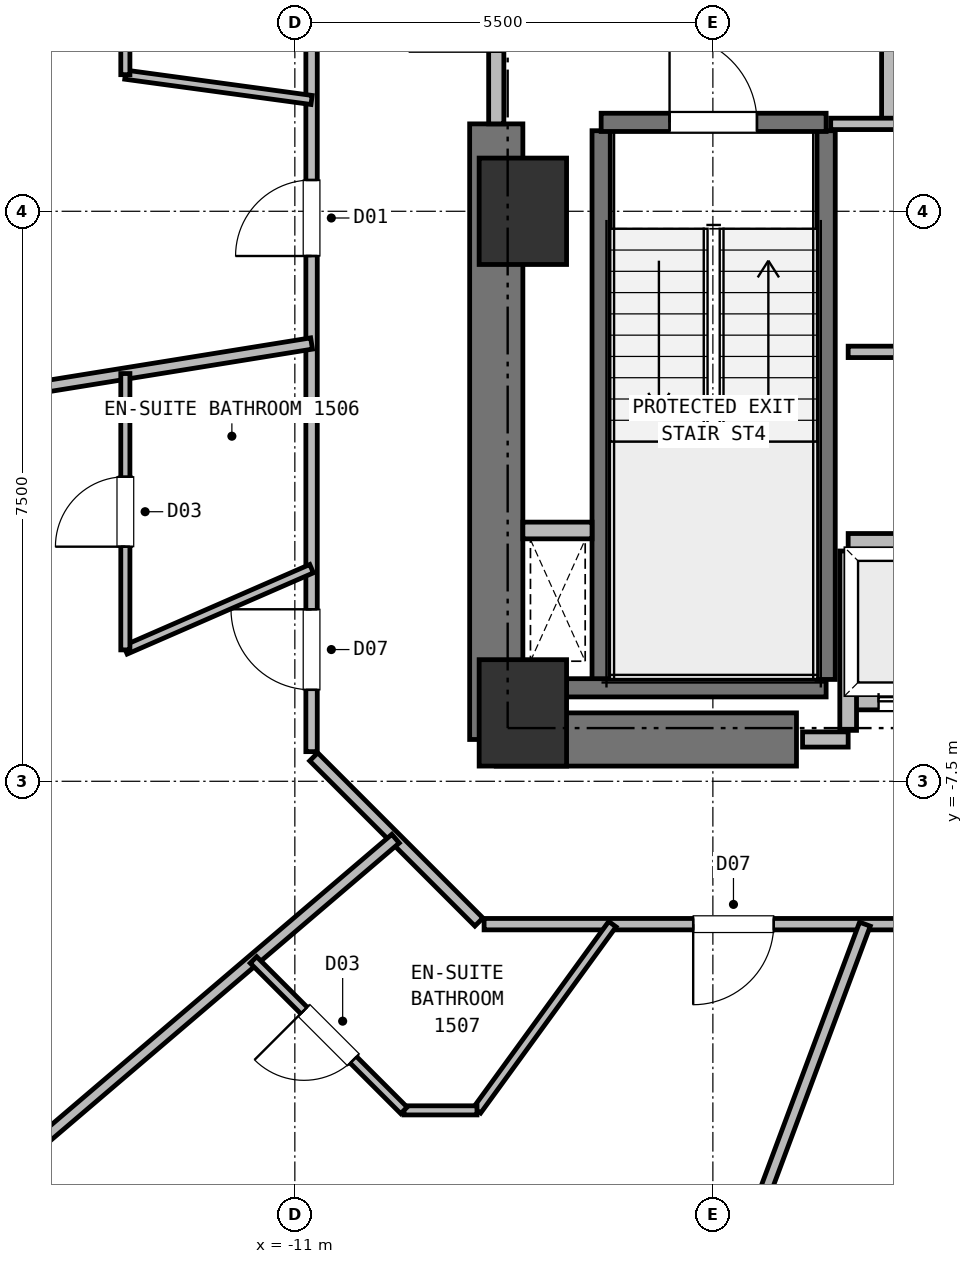
"""IFC4 building model, lengths in metres.
Left out: names, types, materials, properties, quantities, classifications, styles, units other than length and angle.
Written with IfcOpenShell. Run it as: python <this file> out.ifc"""

import sys

from ifc_helpers import new_model, si_unit, direction, frame, frame_2d, origin, origin_2d, place, context, subcontext, project, spatial, rectangle, extrude, element, fill, save


model = new_model("IFC4")
c1 = context("Model", 3, precision=1e-05, world=origin(), true_north=direction((0.0, 1.0)))
c2 = subcontext(c1, "Body", "Model", "MODEL_VIEW")
j1 = project(units=[si_unit("LENGTHUNIT", "METRE"), si_unit("PLANEANGLEUNIT", "RADIAN")], contexts=[c1])
p1 = place(None, origin())
s1 = spatial("IfcSite", under=j1, at=p1, CompositionType="ELEMENT")
p2 = place(p1, origin())
s2 = spatial("IfcBuilding", under=s1, at=p2, CompositionType="ELEMENT")
p3 = place(p2, frame((0.0, 0.0, 53.0)))
s3 = spatial("IfcBuildingStorey", under=s2, at=p3, CompositionType="ELEMENT", Elevation=53.0)
for number, where, z_axis, x_axis in (
    (1, (-8.0, -6.6, 0.0), (0.0, 0.0, 1.0), (1.0, 0.0, 0.0)),
    (2, (-8.0, 0.0, 0.0), (0.0, 0.0, 1.0), (1.0, 0.0, 0.0)),
):
    element("IfcColumn", number, at=place(p3, frame(where, z_axis=z_axis, x_axis=x_axis)), inside=s3, PredefinedType="COLUMN", context=c2, shape_type="SweptSolid", body=[
        extrude(rectangle(XDim=1.15, YDim=1.4, at=origin_2d()), origin(), (0.0, 0.0, 1.0), 3.75),
    ])
p4 = place(p3, frame((-8.35, -6.95, 0.0), z_axis=(0.0, 0.0, 1.0), x_axis=(1.0, 0.0, 0.0)))
e3 = element("IfcWall", 3, at=p4, inside=s3, PredefinedType="SHEAR", context=c2, shape_type="SweptSolid", body=[
    extrude(rectangle(XDim=3.95, YDim=0.7, at=frame_2d((1.975, 0.0))), origin(), (0.0, 0.0, 1.0), 3.5),
])
p5 = place(p3, frame((-8.35, -6.95, 0.0), z_axis=(0.0, 0.0, 1.0), x_axis=(0.0, 1.0, 0.0)))
e4 = element("IfcWall", 4, at=p5, inside=s3, PredefinedType="SHEAR", context=c2, shape_type="SweptSolid", body=[
    extrude(rectangle(XDim=8.1, YDim=0.7, at=frame_2d((4.05, 0.0))), origin(), (0.0, 0.0, 1.0), 3.5),
])
p6 = place(p3, frame((-6.97, -6.16, 0.0), z_axis=(0.0, 0.0, 1.0), x_axis=(0.0, 1.0, 0.0)))
e5 = element("IfcWall", 5, at=p6, inside=s3, PredefinedType="SHEAR", context=c2, shape_type="SweptSolid", body=[
    extrude(rectangle(XDim=7.22, YDim=0.24, at=frame_2d((3.61, 0.0))), origin(), (0.0, 0.0, 1.0), 3.5),
])
p7 = place(p3, frame((-7.425, -6.27, 0.0), z_axis=(0.0, 0.0, 1.0), x_axis=(1.0, 0.0, 0.0)))
e6 = element("IfcWall", 6, at=p7, inside=s3, PredefinedType="SHEAR", context=c2, shape_type="SweptSolid", body=[
    extrude(rectangle(XDim=3.415, YDim=0.24, at=frame_2d((1.708, 0.0))), origin(), (0.0, 0.0, 1.0), 3.5),
])
p8 = place(p3, frame((-4.01, -6.16, 0.0), z_axis=(0.0, 0.0, 1.0), x_axis=(0.0, 1.0, 0.0)))
e7 = element("IfcWall", 7, at=p8, inside=s3, PredefinedType="SHEAR", context=c2, shape_type="SweptSolid", body=[
    extrude(rectangle(XDim=7.22, YDim=0.24, at=frame_2d((3.61, 0.0))), origin(), (0.0, 0.0, 1.0), 3.5),
])
p9 = place(p3, frame((-6.97, 1.17, 0.0), z_axis=(0.0, 0.0, 1.0), x_axis=(1.0, 0.0, 0.0)))
e8 = element("IfcWall", 8, at=p9, inside=s3, PredefinedType="SHEAR", context=c2, shape_type="SweptSolid", body=[
    extrude(rectangle(XDim=2.96, YDim=0.24, at=frame_2d((1.48, 0.0))), origin(), (0.0, 0.0, 1.0), 3.5),
])
p10 = place(p9, frame((0.9, 0.0, 0.0)))
e9 = element("IfcOpeningElement", 9, at=p10, cuts=e8, PredefinedType="OPENING", context=c2, shape_type="SweptSolid", body=[
    extrude(rectangle(XDim=1.15, YDim=2.15, at=frame_2d((0.575, 1.075))), frame((0.0, 0.13, 0.0), z_axis=(0.0, -1.0, 0.0), x_axis=(1.0, 0.0, 0.0)), (0.0, 0.0, 1.0), 0.26),
])
p11 = place(p3, frame((-8.0, -4.2, 0.0), z_axis=(0.0, 0.0, 1.0), x_axis=(1.0, 0.0, 0.0)))
e10 = element("IfcWall", 10, at=p11, inside=s3, PredefinedType="PARTITIONING", context=c2, shape_type="SweptSolid", body=[
    extrude(rectangle(XDim=0.91, YDim=0.22, at=frame_2d((0.455, 0.0))), origin(), (0.0, 0.0, 1.0), 3.5),
])
p12 = place(p3, frame((-3.72, -6.45, 0.0), z_axis=(0.0, 0.0, 1.0), x_axis=(1.0, 0.0, 0.0)))
e11 = element("IfcWall", 11, at=p12, inside=s3, PredefinedType="PARTITIONING", context=c2, shape_type="SweptSolid", body=[
    extrude(rectangle(XDim=1.86, YDim=0.22, at=frame_2d((0.93, 0.0))), origin(), (0.0, 0.0, 1.0), 3.08),
])
p13 = place(p12, frame((0.4, 0.0, 0.0)))
e12 = element("IfcOpeningElement", 12, at=p13, cuts=e11, PredefinedType="OPENING", context=c2, shape_type="SweptSolid", body=[
    extrude(rectangle(XDim=1.06, YDim=2.15, at=frame_2d((0.53, 1.075))), frame((0.0, 0.12, 0.0), z_axis=(0.0, -1.0, 0.0), x_axis=(1.0, 0.0, 0.0)), (0.0, 0.0, 1.0), 0.24),
])
p14 = place(p3, frame((-3.72, -4.35, 0.0), z_axis=(0.0, 0.0, 1.0), x_axis=(1.0, 0.0, 0.0)))
e13 = element("IfcWall", 13, at=p14, inside=s3, PredefinedType="PARTITIONING", context=c2, shape_type="SweptSolid", body=[
    extrude(rectangle(XDim=1.86, YDim=0.22, at=frame_2d((0.93, 0.0))), origin(), (0.0, 0.0, 1.0), 3.5),
])
p15 = place(p3, frame((-3.72, -6.83, 0.0), z_axis=(0.0, 0.0, 1.0), x_axis=(0.0, 1.0, 0.0)))
e14 = element("IfcWall", 14, at=p15, inside=s3, PredefinedType="PARTITIONING", context=c2, shape_type="SweptSolid", body=[
    extrude(rectangle(XDim=2.36, YDim=0.22, at=frame_2d((1.18, 0.0))), origin(), (0.0, 0.0, 1.0), 3.5),
])
p16 = place(p3, frame((-3.18, 1.15, 0.0), z_axis=(0.0, 0.0, 1.0), x_axis=(0.0, 1.0, 0.0)))
e15 = element("IfcWall", 15, at=p16, inside=s3, PredefinedType="PARTITIONING", context=c2, shape_type="SweptSolid", body=[
    extrude(rectangle(XDim=3.3, YDim=0.2, at=frame_2d((1.65, 0.0))), origin(), (0.0, 0.0, 1.0), 3.5),
])
p17 = place(p16, frame((1.08, 0.0, 0.0)))
e16 = element("IfcOpeningElement", 16, at=p17, cuts=e15, PredefinedType="OPENING", context=c2, shape_type="SweptSolid", body=[
    extrude(rectangle(XDim=1.15, YDim=2.15, at=frame_2d((0.575, 1.075))), frame((0.0, 0.11, 0.0), z_axis=(0.0, -1.0, 0.0), x_axis=(1.0, 0.0, 0.0)), (0.0, 0.0, 1.0), 0.22),
])
p18 = place(p3, frame((-8.35, 1.15, 0.0), z_axis=(0.0, 0.0, 1.0), x_axis=(0.0, 1.0, 0.0)))
e17 = element("IfcWall", 17, at=p18, inside=s3, PredefinedType="PARTITIONING", context=c2, shape_type="SweptSolid", body=[
    extrude(rectangle(XDim=5.4, YDim=0.2, at=frame_2d((2.7, 0.0))), origin(), (0.0, 0.0, 1.0), 3.5),
])
p19 = place(p18, frame((0.95, 0.0, 0.0)))
e18 = element("IfcOpeningElement", 18, at=p19, cuts=e17, PredefinedType="OPENING", context=c2, shape_type="SweptSolid", body=[
    extrude(rectangle(XDim=1.15, YDim=2.15, at=frame_2d((0.575, 1.075))), frame((0.0, 0.11, 0.0), z_axis=(0.0, -1.0, 0.0), x_axis=(1.0, 0.0, 0.0)), (0.0, 0.0, 1.0), 0.22),
])
p20 = place(p3, frame((3.95, 1.15, 0.0), z_axis=(0.0, 0.0, 1.0), x_axis=(-1.0, 0.0, 0.0)))
e19 = element("IfcWall", 19, at=p20, inside=s3, PredefinedType="PARTITIONING", context=c2, shape_type="SweptSolid", body=[
    extrude(rectangle(XDim=7.9, YDim=0.15, at=frame_2d((3.95, 0.0))), origin(), (0.0, 0.0, 1.0), 3.5),
])
p21 = place(p20, frame((5.34, 0.0, 0.0)))
e20 = element("IfcOpeningElement", 20, at=p21, cuts=e19, PredefinedType="OPENING", context=c2, shape_type="SweptSolid", body=[
    extrude(rectangle(XDim=0.92, YDim=2.05, at=frame_2d((0.46, 1.025))), frame((0.0, 0.085, 0.0), z_axis=(0.0, -1.0, 0.0), x_axis=(1.0, 0.0, 0.0)), (0.0, 0.0, 1.0), 0.17),
])
p22 = place(p20, frame((1.84, 0.0, 0.0)))
e21 = element("IfcOpeningElement", 21, at=p22, cuts=e19, PredefinedType="OPENING", context=c2, shape_type="SweptSolid", body=[
    extrude(rectangle(XDim=0.92, YDim=2.05, at=frame_2d((0.46, 1.025))), frame((0.0, 0.085, 0.0), z_axis=(0.0, -1.0, 0.0), x_axis=(1.0, 0.0, 0.0)), (0.0, 0.0, 1.0), 0.17),
])
p23 = place(p3, frame((-4.32, -6.95, 0.0), z_axis=(0.0, 0.0, 1.0), x_axis=(1.0, 0.0, 0.0)))
e22 = element("IfcWall", 22, at=p23, inside=s3, PredefinedType="PARTITIONING", context=c2, shape_type="SweptSolid", body=[
    extrude(rectangle(XDim=0.6, YDim=0.2, at=frame_2d((0.3, 0.0))), origin(), (0.0, 0.0, 1.0), 3.5),
])
p24 = place(p3, frame((-3.72, -1.85, 0.0), z_axis=(0.0, 0.0, 1.0), x_axis=(1.0, 0.0, 0.0)))
e23 = element("IfcWall", 23, at=p24, inside=s3, PredefinedType="PARTITIONING", context=c2, shape_type="SweptSolid", body=[
    extrude(rectangle(XDim=7.44, YDim=0.15, at=frame_2d((3.72, 0.0))), origin(), (0.0, 0.0, 1.0), 3.5),
])
p25 = place(p24, frame((1.21, 0.0, 0.0)))
e24 = element("IfcOpeningElement", 24, at=p25, cuts=e23, PredefinedType="OPENING", context=c2, shape_type="SweptSolid", body=[
    extrude(rectangle(XDim=0.92, YDim=2.05, at=frame_2d((0.46, 1.025))), frame((0.0, 0.085, 0.0), z_axis=(0.0, -1.0, 0.0), x_axis=(1.0, 0.0, 0.0)), (0.0, 0.0, 1.0), 0.17),
])
p26 = place(p24, frame((4.91, 0.0, 0.0)))
e25 = element("IfcOpeningElement", 25, at=p26, cuts=e23, PredefinedType="OPENING", context=c2, shape_type="SweptSolid", body=[
    extrude(rectangle(XDim=0.92, YDim=2.05, at=frame_2d((0.46, 1.025))), frame((0.0, 0.085, 0.0), z_axis=(0.0, -1.0, 0.0), x_axis=(1.0, 0.0, 0.0)), (0.0, 0.0, 1.0), 0.17),
])
p27 = place(p3, frame((8.51, -9.38, 0.0), z_axis=(0.0, 0.0, 1.0), x_axis=(-1.0, 0.0, 0.0)))
e26 = element("IfcWall", 26, at=p27, inside=s3, PredefinedType="PARTITIONING", context=c2, shape_type="SweptSolid", body=[
    extrude(rectangle(XDim=17.02, YDim=0.15, at=frame_2d((8.51, 0.0))), origin(), (0.0, 0.0, 1.0), 3.5),
])
p28 = place(p27, frame((8.419, 0.0, 0.0)))
e27 = element("IfcOpeningElement", 27, at=p28, cuts=e26, PredefinedType="OPENING", context=c2, shape_type="SweptSolid", body=[
    extrude(rectangle(XDim=0.95, YDim=2.1, at=frame_2d((0.475, 1.05))), frame((0.0, 0.085, 0.0), z_axis=(0.0, -1.0, 0.0), x_axis=(1.0, 0.0, 0.0)), (0.0, 0.0, 1.0), 0.17),
])
p29 = place(p27, frame((10.488, 0.0, 0.0)))
e28 = element("IfcOpeningElement", 28, at=p29, cuts=e26, PredefinedType="OPENING", context=c2, shape_type="SweptSolid", body=[
    extrude(rectangle(XDim=1.0, YDim=2.15, at=frame_2d((0.5, 1.075))), frame((0.0, 0.085, 0.0), z_axis=(0.0, -1.0, 0.0), x_axis=(1.0, 0.0, 0.0)), (0.0, 0.0, 1.0), 0.17),
])
p30 = place(p27, frame((3.015, 0.0, 0.0)))
e29 = element("IfcOpeningElement", 29, at=p30, cuts=e26, PredefinedType="OPENING", context=c2, shape_type="SweptSolid", body=[
    extrude(rectangle(XDim=1.06, YDim=2.15, at=frame_2d((0.53, 1.075))), frame((0.0, 0.085, 0.0), z_axis=(0.0, -1.0, 0.0), x_axis=(1.0, 0.0, 0.0)), (0.0, 0.0, 1.0), 0.17),
])
p31 = place(p27, frame((13.209, 0.0, 0.0)))
e30 = element("IfcOpeningElement", 30, at=p31, cuts=e26, PredefinedType="OPENING", context=c2, shape_type="SweptSolid", body=[
    extrude(rectangle(XDim=1.06, YDim=2.15, at=frame_2d((0.53, 1.075))), frame((0.0, 0.085, 0.0), z_axis=(0.0, -1.0, 0.0), x_axis=(1.0, 0.0, 0.0)), (0.0, 0.0, 1.0), 0.17),
])
p32 = place(p3, frame((-10.78, -7.11, 0.0), z_axis=(0.0, 0.0, 1.0), x_axis=(0.0, 1.0, 0.0)))
e31 = element("IfcWall", 31, at=p32, inside=s3, PredefinedType="PARTITIONING", context=c2, shape_type="SweptSolid", body=[
    extrude(rectangle(XDim=14.22, YDim=0.15, at=frame_2d((7.11, 0.0))), origin(), (0.0, 0.0, 1.0), 3.12),
])
p33 = place(p32, frame((12.278, 0.0, 0.0)))
e32 = element("IfcOpeningElement", 32, at=p33, cuts=e31, PredefinedType="OPENING", context=c2, shape_type="SweptSolid", body=[
    extrude(rectangle(XDim=1.06, YDim=2.15, at=frame_2d((0.53, 1.075))), frame((0.0, 0.085, 0.0), z_axis=(0.0, -1.0, 0.0), x_axis=(1.0, 0.0, 0.0)), (0.0, 0.0, 1.0), 0.17),
])
p34 = place(p32, frame((6.521, 0.0, 0.0)))
e33 = element("IfcOpeningElement", 33, at=p34, cuts=e31, PredefinedType="OPENING", context=c2, shape_type="SweptSolid", body=[
    extrude(rectangle(XDim=1.0, YDim=2.15, at=frame_2d((0.5, 1.075))), frame((0.0, 0.085, 0.0), z_axis=(0.0, -1.0, 0.0), x_axis=(1.0, 0.0, 0.0)), (0.0, 0.0, 1.0), 0.17),
])
p35 = place(p32, frame((0.813, 0.0, 0.0)))
e34 = element("IfcOpeningElement", 34, at=p35, cuts=e31, PredefinedType="OPENING", context=c2, shape_type="SweptSolid", body=[
    extrude(rectangle(XDim=1.06, YDim=2.15, at=frame_2d((0.53, 1.075))), frame((0.0, 0.085, 0.0), z_axis=(0.0, -1.0, 0.0), x_axis=(1.0, 0.0, 0.0)), (0.0, 0.0, 1.0), 0.17),
])
p36 = place(p3, frame((-8.578, -9.352, 0.0), z_axis=(0.0, 0.0, 1.0), x_axis=(-0.707067066127, 0.707146494016, 0.0)))
e35 = element("IfcWall", 35, at=p36, inside=s3, PredefinedType="PARTITIONING", context=c2, shape_type="SweptSolid", body=[
    extrude(rectangle(XDim=3.074, YDim=0.15, at=frame_2d((1.537, 0.0))), origin(), (0.0, 0.0, 1.0), 3.5),
])
p37 = place(p3, frame((-10.78, 1.465, 0.0), z_axis=(0.0, 0.0, 1.0), x_axis=(-0.990901533964, 0.134588818215, 0.0)))
e36 = element("IfcWall", 36, at=p37, inside=s3, PredefinedType="PARTITIONING", context=c2, shape_type="SweptSolid", body=[
    extrude(rectangle(XDim=2.472, YDim=0.12, at=frame_2d((1.236, 0.0))), origin(), (0.0, 0.0, 1.0), 3.5),
])
p38 = place(p3, frame((-13.23, 1.797, 0.0), z_axis=(0.0, 0.0, 1.0), x_axis=(0.0, 1.0, 0.0)))
e37 = element("IfcWall", 37, at=p38, inside=s3, PredefinedType="PARTITIONING", context=c2, shape_type="SweptSolid", body=[
    extrude(rectangle(XDim=3.585, YDim=0.12, at=frame_2d((1.792, 0.0))), origin(), (0.0, 0.0, 1.0), 3.5),
])
p39 = place(p38, frame((1.332, 0.0, 0.0)))
e38 = element("IfcOpeningElement", 38, at=p39, cuts=e37, PredefinedType="OPENING", context=c2, shape_type="SweptSolid", body=[
    extrude(rectangle(XDim=0.92, YDim=2.1, at=frame_2d((0.46, 1.05))), frame((0.0, 0.07, 0.0), z_axis=(0.0, -1.0, 0.0), x_axis=(1.0, 0.0, 0.0)), (0.0, 0.0, 1.0), 0.14),
])
p40 = place(p3, frame((-10.78, -1.74, 0.0), z_axis=(0.0, 0.0, 1.0), x_axis=(-0.987228687092, -0.159309508134, 0.0)))
e39 = element("IfcWall", 39, at=p40, inside=s3, PredefinedType="PARTITIONING", context=c2, shape_type="SweptSolid", body=[
    extrude(rectangle(XDim=9.362, YDim=0.15, at=frame_2d((4.681, 0.0))), origin(), (0.0, 0.0, 1.0), 3.5),
])
p41 = place(p3, frame((-10.78, -4.702, 0.0), z_axis=(0.0, 0.0, 1.0), x_axis=(-0.916569813028, -0.399874702684, 0.0)))
e40 = element("IfcWall", 40, at=p41, inside=s3, PredefinedType="PARTITIONING", context=c2, shape_type="SweptSolid", body=[
    extrude(rectangle(XDim=2.673, YDim=0.12, at=frame_2d((1.336, 0.0))), origin(), (0.0, 0.0, 1.0), 3.5),
])
p42 = place(p3, frame((-13.23, -5.771, 0.0), z_axis=(0.0, 0.0, 1.0), x_axis=(0.0, 1.0, 0.0)))
e41 = element("IfcWall", 41, at=p42, inside=s3, PredefinedType="PARTITIONING", context=c2, shape_type="SweptSolid", body=[
    extrude(rectangle(XDim=3.636, YDim=0.12, at=frame_2d((1.818, 0.0))), origin(), (0.0, 0.0, 1.0), 3.12),
])
p43 = place(p42, frame((1.358, 0.0, 0.0)))
e42 = element("IfcOpeningElement", 42, at=p43, cuts=e41, PredefinedType="OPENING", context=c2, shape_type="SweptSolid", body=[
    extrude(rectangle(XDim=0.92, YDim=2.1, at=frame_2d((0.46, 1.05))), frame((0.0, 0.07, 0.0), z_axis=(0.0, -1.0, 0.0), x_axis=(1.0, 0.0, 0.0)), (0.0, 0.0, 1.0), 0.14),
])
p44 = place(p3, frame((-9.675, -8.255, 0.0), z_axis=(0.0, 0.0, 1.0), x_axis=(-0.760712977927, -0.649088410937, 0.0)))
e43 = element("IfcWall", 43, at=p44, inside=s3, PredefinedType="PARTITIONING", context=c2, shape_type="SweptSolid", body=[
    extrude(rectangle(XDim=12.574, YDim=0.15, at=frame_2d((6.287, 0.0))), origin(), (0.0, 0.0, 1.0), 3.5),
])
p45 = place(p3, frame((-8.604, -11.83, 0.0), z_axis=(0.0, 0.0, 1.0), x_axis=(0.58812378006, 0.808770931307, 0.0)))
e44 = element("IfcWall", 44, at=p45, inside=s3, PredefinedType="PARTITIONING", context=c2, shape_type="SweptSolid", body=[
    extrude(rectangle(XDim=3.03, YDim=0.12, at=frame_2d((1.515, 0.0))), origin(), (0.0, 0.0, 1.0), 3.5),
])
p46 = place(p3, frame((-8.604, -11.83, 0.0), z_axis=(0.0, 0.0, 1.0), x_axis=(-1.0, 0.0, 0.0)))
e45 = element("IfcWall", 45, at=p46, inside=s3, PredefinedType="PARTITIONING", context=c2, shape_type="SweptSolid", body=[
    extrude(rectangle(XDim=0.961, YDim=0.12, at=frame_2d((0.48, 0.0))), origin(), (0.0, 0.0, 1.0), 3.5),
])
p47 = place(p3, frame((-9.565, -11.83, 0.0), z_axis=(0.0, 0.0, 1.0), x_axis=(-0.707150377276, 0.707063182409, 0.0)))
e46 = element("IfcWall", 46, at=p47, inside=s3, PredefinedType="PARTITIONING", context=c2, shape_type="SweptSolid", body=[
    extrude(rectangle(XDim=2.8, YDim=0.12, at=frame_2d((1.4, 0.0))), origin(), (0.0, 0.0, 1.0), 3.5),
])
p48 = place(p47, frame((0.94, 0.0, 0.0)))
e47 = element("IfcOpeningElement", 47, at=p48, cuts=e46, PredefinedType="OPENING", context=c2, shape_type="SweptSolid", body=[
    extrude(rectangle(XDim=0.92, YDim=2.1, at=frame_2d((0.46, 1.05))), frame((0.0, 0.07, 0.0), z_axis=(0.0, -1.0, 0.0), x_axis=(1.0, 0.0, 0.0)), (0.0, 0.0, 1.0), 0.14),
])
p49 = place(p3, frame((-3.5, -9.38, 0.0), z_axis=(0.0, 0.0, 1.0), x_axis=(-0.349539963134, -0.936921455711, 0.0)))
e48 = element("IfcWall", 48, at=p49, inside=s3, PredefinedType="PARTITIONING", context=c2, shape_type="SweptSolid", body=[
    extrude(rectangle(XDim=9.364, YDim=0.15, at=frame_2d((4.682, 0.0))), origin(), (0.0, 0.0, 1.0), 3.5),
])
p50 = place(p10, origin())
e49 = element("IfcDoor", 49, at=p50, inside=s3, OperationType="SINGLE_SWING_LEFT", PredefinedType="DOOR", context=c2, shape_type="SweptSolid", body=[
    extrude(rectangle(XDim=1.15, YDim=2.15, at=frame_2d((0.575, 1.075))), frame((0.0, 0.025, 0.0), z_axis=(0.0, -1.0, 0.0), x_axis=(1.0, 0.0, 0.0)), (0.0, 0.0, 1.0), 0.05),
])
fill(e9, e49)
p51 = place(p13, origin())
e50 = element("IfcDoor", 50, at=p51, inside=s3, OperationType="DOUBLE_DOOR_SLIDING", PredefinedType="DOOR", context=c2, shape_type="SweptSolid", body=[
    extrude(rectangle(XDim=1.06, YDim=2.15, at=frame_2d((0.53, 1.075))), frame((0.0, 0.025, 0.0), z_axis=(0.0, -1.0, 0.0), x_axis=(1.0, 0.0, 0.0)), (0.0, 0.0, 1.0), 0.05),
])
fill(e12, e50)
p52 = place(p19, origin())
e51 = element("IfcDoor", 51, at=p52, inside=s3, OperationType="SINGLE_SWING_LEFT", PredefinedType="DOOR", context=c2, shape_type="SweptSolid", body=[
    extrude(rectangle(XDim=1.15, YDim=2.15, at=frame_2d((0.575, 1.075))), frame((0.0, 0.025, 0.0), z_axis=(0.0, -1.0, 0.0), x_axis=(1.0, 0.0, 0.0)), (0.0, 0.0, 1.0), 0.05),
])
fill(e18, e51)
p53 = place(p43, origin())
e52 = element("IfcDoor", 52, at=p53, inside=s3, OperationType="SINGLE_SWING_LEFT", PredefinedType="DOOR", context=c2, shape_type="SweptSolid", body=[
    extrude(rectangle(XDim=0.92, YDim=2.1, at=frame_2d((0.46, 1.05))), frame((0.0, 0.025, 0.0), z_axis=(0.0, -1.0, 0.0), x_axis=(1.0, 0.0, 0.0)), (0.0, 0.0, 1.0), 0.05),
])
fill(e42, e52)
p54 = place(p48, origin())
e53 = element("IfcDoor", 53, at=p54, inside=s3, OperationType="SINGLE_SWING_RIGHT", PredefinedType="DOOR", context=c2, shape_type="SweptSolid", body=[
    extrude(rectangle(XDim=0.92, YDim=2.1, at=frame_2d((0.46, 1.05))), frame((0.0, 0.025, 0.0), z_axis=(0.0, -1.0, 0.0), x_axis=(1.0, 0.0, 0.0)), (0.0, 0.0, 1.0), 0.05),
])
fill(e47, e53)
p55 = place(p34, origin())
e54 = element("IfcDoor", 54, at=p55, inside=s3, OperationType="SINGLE_SWING_LEFT", PredefinedType="DOOR", context=c2, shape_type="SweptSolid", body=[
    extrude(rectangle(XDim=1.0, YDim=2.15, at=frame_2d((0.5, 1.075))), frame((0.0, 0.025, 0.0), z_axis=(0.0, -1.0, 0.0), x_axis=(1.0, 0.0, 0.0)), (0.0, 0.0, 1.0), 0.05),
])
fill(e33, e54)
p56 = place(p31, origin())
e55 = element("IfcDoor", 55, at=p56, inside=s3, OperationType="SINGLE_SWING_RIGHT", PredefinedType="DOOR", context=c2, shape_type="SweptSolid", body=[
    extrude(rectangle(XDim=1.06, YDim=2.15, at=frame_2d((0.53, 1.075))), frame((0.0, 0.025, 0.0), z_axis=(0.0, -1.0, 0.0), x_axis=(1.0, 0.0, 0.0)), (0.0, 0.0, 1.0), 0.05),
])
fill(e30, e55)
p57 = place(p35, origin())
e56 = element("IfcDoor", 56, at=p57, inside=s3, OperationType="SINGLE_SWING_RIGHT", PredefinedType="DOOR", context=c2, shape_type="SweptSolid", body=[
    extrude(rectangle(XDim=1.06, YDim=2.15, at=frame_2d((0.53, 1.075))), frame((0.0, 0.025, 0.0), z_axis=(0.0, -1.0, 0.0), x_axis=(1.0, 0.0, 0.0)), (0.0, 0.0, 1.0), 0.05),
])
fill(e34, e56)
save(model, sys.argv[1])
